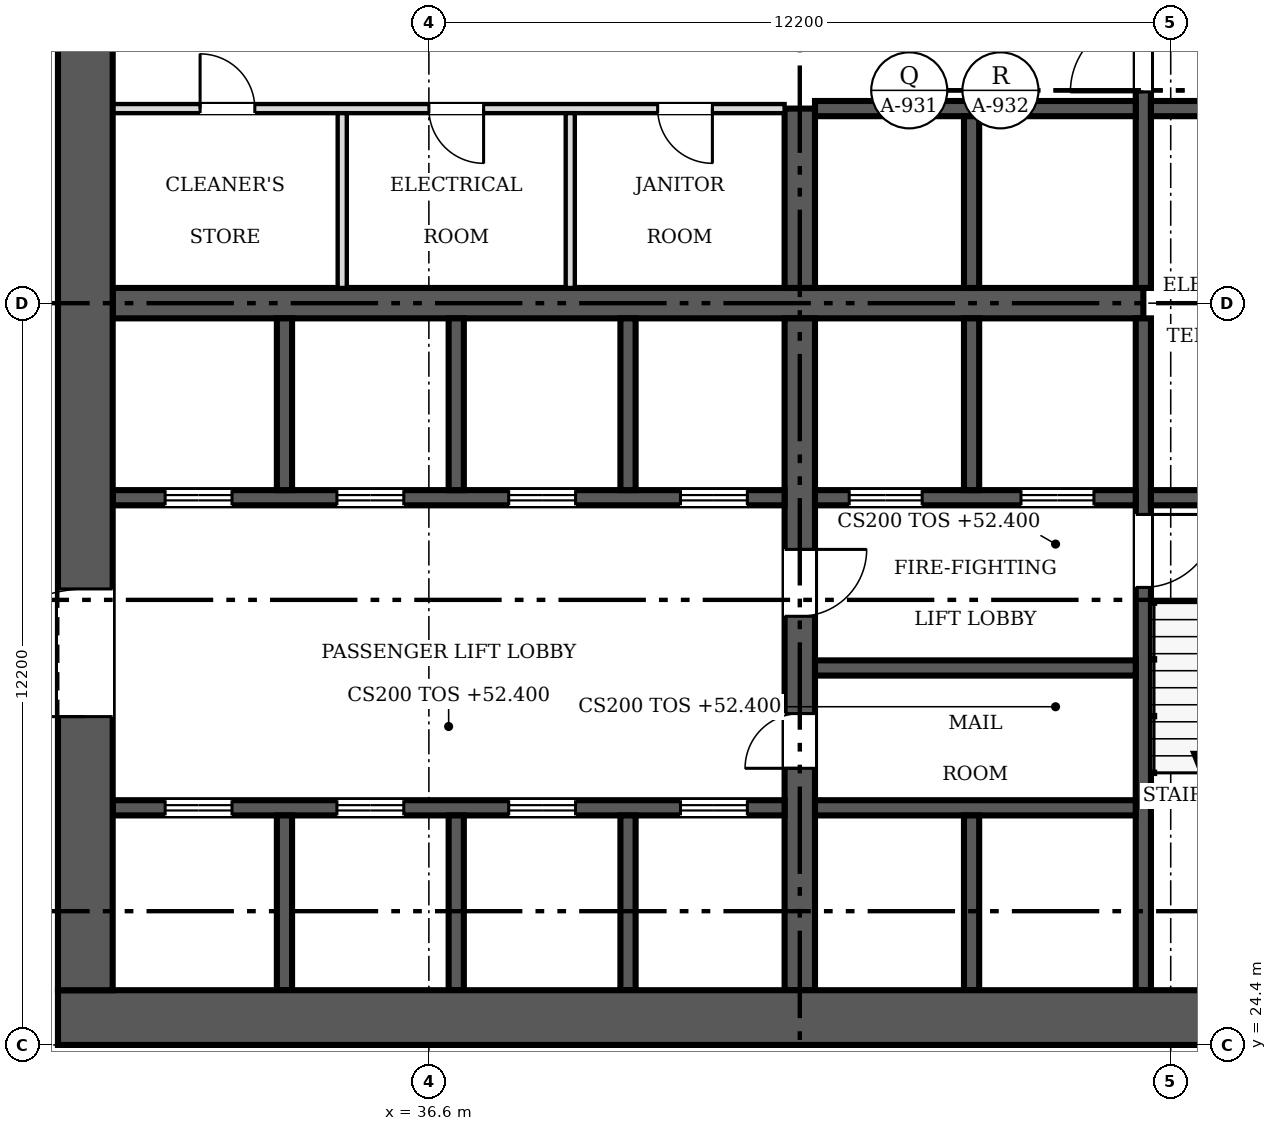
"""IFC4 building model, lengths in metres.
Left out: names, types, materials, properties, quantities, classifications, styles, units other than length and angle.
Written with IfcOpenShell. Run it as: python <this file> out.ifc"""

import sys

from ifc_helpers import new_model, si_unit, direction, frame, frame_2d, origin, place, context, subcontext, project, spatial, rectangle, extrude, source, transform, mapped, element, fill, save


model = new_model("IFC4")
c1 = context("Model", 3, precision=1e-05, world=origin(), true_north=direction((0.0, 1.0)))
c2 = subcontext(c1, "Body", "Model", "MODEL_VIEW")
j1 = project(units=[si_unit("LENGTHUNIT", "METRE"), si_unit("PLANEANGLEUNIT", "RADIAN")], contexts=[c1])
p1 = place(None, origin())
s1 = spatial("IfcSite", under=j1, at=p1, CompositionType="ELEMENT")
p2 = place(p1, origin())
s2 = spatial("IfcBuilding", under=s1, at=p2, CompositionType="ELEMENT")
p3 = place(p2, frame((0.0, 0.0, 52.4)))
s3 = spatial("IfcBuildingStorey", under=s2, at=p3, CompositionType="ELEMENT", Elevation=52.4)
p4 = place(p3, frame((54.9, 24.85, 0.0), z_axis=(0.0, 0.0, 1.0), x_axis=(-1.0, 0.0, 0.0)))
e1 = element("IfcWall", 1, at=p4, inside=s3, PredefinedType="SHEAR", context=c2, shape_type="SweptSolid", body=[
    extrude(rectangle(XDim=24.4, YDim=0.9, at=frame_2d((12.2, 0.0))), origin(), (0.0, 0.0, 1.0), 3.8),
])
m1 = source(origin(), c2, "Body", "SweptSolid", [
    extrude(rectangle(XDim=1.2, YDim=2.1, at=frame_2d((0.6, 1.05))), frame((0.0, 0.46, 0.0), z_axis=(0.0, -1.0, 0.0), x_axis=(1.0, 0.0, 0.0)), (0.0, 0.0, 1.0), 0.92),
])
p5 = place(p4, frame((1.5, 0.0, 0.0)))
e2 = element("IfcOpeningElement", 2, at=p5, cuts=e1, PredefinedType="OPENING", context=c2, shape_type="MappedRepresentation", body=[
    mapped(m1, transform((0.0, 0.0, 0.0), scale=1.0)),
])
p6 = place(p3, frame((30.95, 25.3, 0.0), z_axis=(0.0, 0.0, 1.0), x_axis=(0.0, 1.0, 0.0)))
e3 = element("IfcWall", 3, at=p6, inside=s3, PredefinedType="SHEAR", context=c2, shape_type="SweptSolid", body=[
    extrude(rectangle(XDim=22.6, YDim=0.9, at=frame_2d((11.3, 0.0))), origin(), (0.0, 0.0, 1.0), 3.8),
])
m2 = source(origin(), c2, "Body", "SweptSolid", [
    extrude(rectangle(XDim=2.1, YDim=2.4, at=frame_2d((1.05, 1.2))), frame((0.0, 0.46, 0.0), z_axis=(0.0, -1.0, 0.0), x_axis=(1.0, 0.0, 0.0)), (0.0, 0.0, 1.0), 0.92),
])
p7 = place(p6, frame((4.5, 0.0, 0.0)))
e4 = element("IfcOpeningElement", 4, at=p7, cuts=e3, PredefinedType="OPENING", context=c2, shape_type="MappedRepresentation", body=[
    mapped(m2, transform((0.0, 0.0, 0.0), scale=1.0)),
])
p8 = place(p6, frame((16.0, 0.0, 0.0)))
e5 = element("IfcOpeningElement", 5, at=p8, cuts=e3, PredefinedType="OPENING", context=c2, shape_type="MappedRepresentation", body=[
    mapped(m2, transform((0.0, 0.0, 0.0), scale=1.0)),
])
p9 = place(p3, frame((31.4, 36.6, 0.0), z_axis=(0.0, 0.0, 1.0), x_axis=(1.0, 0.0, 0.0)))
e6 = element("IfcWall", 6, at=p9, inside=s3, PredefinedType="SHEAR", context=c2, shape_type="SweptSolid", body=[
    extrude(rectangle(XDim=16.95, YDim=0.5, at=frame_2d((8.475, 0.0))), origin(), (0.0, 0.0, 1.0), 3.8),
])
p10 = place(p3, frame((42.7, 36.35, 0.0), z_axis=(0.0, 0.0, 1.0), x_axis=(0.0, -1.0, 0.0)))
e7 = element("IfcWall", 7, at=p10, inside=s3, PredefinedType="SHEAR", context=c2, shape_type="SweptSolid", body=[
    extrude(rectangle(XDim=11.05, YDim=0.5, at=frame_2d((5.525, 0.0))), origin(), (0.0, 0.0, 1.0), 3.8),
])
m3 = source(origin(), c2, "Body", "SweptSolid", [
    extrude(rectangle(XDim=0.9, YDim=2.1, at=frame_2d((0.45, 1.05))), frame((0.0, 0.26, 0.0), z_axis=(0.0, -1.0, 0.0), x_axis=(1.0, 0.0, 0.0)), (0.0, 0.0, 1.0), 0.52),
])
p11 = place(p10, frame((6.5, 0.0, 0.0)))
e8 = element("IfcOpeningElement", 8, at=p11, cuts=e7, PredefinedType="OPENING", context=c2, shape_type="MappedRepresentation", body=[
    mapped(m3, transform((0.0, 0.0, 0.0), scale=1.0)),
])
m4 = source(origin(), c2, "Body", "SweptSolid", [
    extrude(rectangle(XDim=1.1, YDim=2.1, at=frame_2d((0.55, 1.05))), frame((0.0, 0.26, 0.0), z_axis=(0.0, -1.0, 0.0), x_axis=(1.0, 0.0, 0.0)), (0.0, 0.0, 1.0), 0.52),
])
p12 = place(p10, frame((3.8, 0.0, 0.0)))
e9 = element("IfcOpeningElement", 9, at=p12, cuts=e7, PredefinedType="OPENING", context=c2, shape_type="MappedRepresentation", body=[
    mapped(m4, transform((0.0, 0.0, 0.0), scale=1.0)),
])
p13 = place(p3, frame((42.7, 36.85, 0.0), z_axis=(0.0, 0.0, 1.0), x_axis=(0.0, 1.0, 0.0)))
e10 = element("IfcWall", 10, at=p13, inside=s3, PredefinedType="SHEAR", context=c2, shape_type="SweptSolid", body=[
    extrude(rectangle(XDim=2.95, YDim=0.5, at=frame_2d((1.475, 0.0))), origin(), (0.0, 0.0, 1.0), 3.8),
])
p14 = place(p3, frame((48.35, 36.35, 0.0), z_axis=(0.0, 0.0, 1.0), x_axis=(0.0, -1.0, 0.0)))
e11 = element("IfcWall", 11, at=p14, inside=s3, PredefinedType="SOLIDWALL", context=c2, shape_type="SweptSolid", body=[
    extrude(rectangle(XDim=11.05, YDim=0.25, at=frame_2d((5.525, 0.0))), origin(), (0.0, 0.0, 1.0), 3.8),
])
m5 = source(origin(), c2, "Body", "SweptSolid", [
    extrude(rectangle(XDim=1.2, YDim=2.1, at=frame_2d((0.6, 1.05))), frame((0.0, 0.135, 0.0), z_axis=(0.0, -1.0, 0.0), x_axis=(1.0, 0.0, 0.0)), (0.0, 0.0, 1.0), 0.27),
])
p15 = place(p14, frame((3.225, 0.0, 0.0)))
e12 = element("IfcOpeningElement", 12, at=p15, cuts=e11, PredefinedType="OPENING", context=c2, shape_type="MappedRepresentation", body=[
    mapped(m5, transform((0.0, 0.0, 0.0), scale=1.0)),
])
p16 = place(p3, frame((48.35, 47.9, 0.0), z_axis=(0.0, 0.0, 1.0), x_axis=(0.0, -1.0, 0.0)))
e13 = element("IfcWall", 13, at=p16, inside=s3, PredefinedType="SOLIDWALL", context=c2, shape_type="SweptSolid", body=[
    extrude(rectangle(XDim=11.05, YDim=0.25, at=frame_2d((5.525, 0.0))), origin(), (0.0, 0.0, 1.0), 3.8),
])
p17 = place(p16, frame((6.625, 0.0, 0.0)))
e14 = element("IfcOpeningElement", 14, at=p17, cuts=e13, PredefinedType="OPENING", context=c2, shape_type="MappedRepresentation", body=[
    mapped(m5, transform((0.0, 0.0, 0.0), scale=1.0)),
])
p18 = place(p3, frame((42.45, 33.4, 0.0), z_axis=(0.0, 0.0, 1.0), x_axis=(-1.0, 0.0, 0.0)))
e15 = element("IfcWall", 15, at=p18, inside=s3, PredefinedType="SOLIDWALL", context=c2, shape_type="SweptSolid", body=[
    extrude(rectangle(XDim=11.05, YDim=0.25, at=frame_2d((5.525, 0.0))), origin(), (0.0, 0.0, 1.0), 3.8),
])
m6 = source(origin(), c2, "Body", "SweptSolid", [
    extrude(rectangle(XDim=1.1, YDim=2.1, at=frame_2d((0.55, 1.05))), frame((0.0, 0.135, 0.0), z_axis=(0.0, -1.0, 0.0), x_axis=(1.0, 0.0, 0.0)), (0.0, 0.0, 1.0), 0.27),
])
p19 = place(p18, frame((9.087, 0.0, 0.0)))
e16 = element("IfcOpeningElement", 16, at=p19, cuts=e15, PredefinedType="OPENING", context=c2, shape_type="MappedRepresentation", body=[
    mapped(m6, transform((0.0, 0.0, 0.0), scale=1.0)),
])
p20 = place(p18, frame((6.262, 0.0, 0.0)))
e17 = element("IfcOpeningElement", 17, at=p20, cuts=e15, PredefinedType="OPENING", context=c2, shape_type="MappedRepresentation", body=[
    mapped(m6, transform((0.0, 0.0, 0.0), scale=1.0)),
])
p21 = place(p18, frame((3.438, 0.0, 0.0)))
e18 = element("IfcOpeningElement", 18, at=p21, cuts=e15, PredefinedType="OPENING", context=c2, shape_type="MappedRepresentation", body=[
    mapped(m6, transform((0.0, 0.0, 0.0), scale=1.0)),
])
p22 = place(p18, frame((0.613, 0.0, 0.0)))
e19 = element("IfcOpeningElement", 19, at=p22, cuts=e15, PredefinedType="OPENING", context=c2, shape_type="MappedRepresentation", body=[
    mapped(m6, transform((0.0, 0.0, 0.0), scale=1.0)),
])
p23 = place(p3, frame((48.225, 33.4, 0.0), z_axis=(0.0, 0.0, 1.0), x_axis=(-1.0, 0.0, 0.0)))
e20 = element("IfcWall", 20, at=p23, inside=s3, PredefinedType="SOLIDWALL", context=c2, shape_type="SweptSolid", body=[
    extrude(rectangle(XDim=5.275, YDim=0.25, at=frame_2d((2.638, 0.0))), origin(), (0.0, 0.0, 1.0), 3.8),
])
p24 = place(p23, frame((3.512, 0.0, 0.0)))
e21 = element("IfcOpeningElement", 21, at=p24, cuts=e20, PredefinedType="OPENING", context=c2, shape_type="MappedRepresentation", body=[
    mapped(m5, transform((0.0, 0.0, 0.0), scale=1.0)),
])
p25 = place(p23, frame((0.688, 0.0, 0.0)))
e22 = element("IfcOpeningElement", 22, at=p25, cuts=e20, PredefinedType="OPENING", context=c2, shape_type="MappedRepresentation", body=[
    mapped(m5, transform((0.0, 0.0, 0.0), scale=1.0)),
])
p26 = place(p3, frame((48.475, 33.4, 0.0), z_axis=(0.0, 0.0, 1.0), x_axis=(1.0, 0.0, 0.0)))
e23 = element("IfcWall", 23, at=p26, inside=s3, PredefinedType="SOLIDWALL", context=c2, shape_type="SweptSolid", body=[
    extrude(rectangle(XDim=3.525, YDim=0.25, at=frame_2d((1.762, 0.0))), origin(), (0.0, 0.0, 1.0), 3.8),
])
p27 = place(p3, frame((31.4, 28.3, 0.0), z_axis=(0.0, 0.0, 1.0), x_axis=(1.0, 0.0, 0.0)))
e24 = element("IfcWall", 24, at=p27, inside=s3, PredefinedType="SOLIDWALL", context=c2, shape_type="SweptSolid", body=[
    extrude(rectangle(XDim=11.05, YDim=0.25, at=frame_2d((5.525, 0.0))), origin(), (0.0, 0.0, 1.0), 3.8),
])
p28 = place(p27, frame((0.863, 0.0, 0.0)))
e25 = element("IfcOpeningElement", 25, at=p28, cuts=e24, PredefinedType="OPENING", context=c2, shape_type="MappedRepresentation", body=[
    mapped(m6, transform((0.0, 0.0, 0.0), scale=1.0)),
])
p29 = place(p27, frame((3.688, 0.0, 0.0)))
e26 = element("IfcOpeningElement", 26, at=p29, cuts=e24, PredefinedType="OPENING", context=c2, shape_type="MappedRepresentation", body=[
    mapped(m6, transform((0.0, 0.0, 0.0), scale=1.0)),
])
p30 = place(p27, frame((6.512, 0.0, 0.0)))
e27 = element("IfcOpeningElement", 27, at=p30, cuts=e24, PredefinedType="OPENING", context=c2, shape_type="MappedRepresentation", body=[
    mapped(m6, transform((0.0, 0.0, 0.0), scale=1.0)),
])
p31 = place(p27, frame((9.337, 0.0, 0.0)))
e28 = element("IfcOpeningElement", 28, at=p31, cuts=e24, PredefinedType="OPENING", context=c2, shape_type="MappedRepresentation", body=[
    mapped(m6, transform((0.0, 0.0, 0.0), scale=1.0)),
])
for number, where, z_axis, x_axis in (
    (29, (42.95, 28.3, 0.0), (0.0, 0.0, 1.0), (1.0, 0.0, 0.0)),
    (30, (42.95, 39.8, 0.0), (0.0, 0.0, 1.0), (1.0, 0.0, 0.0)),
):
    element("IfcWall", number, at=place(p3, frame(where, z_axis=z_axis, x_axis=x_axis)), inside=s3, PredefinedType="SOLIDWALL", context=c2, shape_type="SweptSolid", body=[
        extrude(rectangle(XDim=5.275, YDim=0.25, at=frame_2d((2.638, 0.0))), origin(), (0.0, 0.0, 1.0), 3.8),
    ])
p32 = place(p3, frame((48.475, 39.8, 0.0), z_axis=(0.0, 0.0, 1.0), x_axis=(1.0, 0.0, 0.0)))
e31 = element("IfcWall", 31, at=p32, inside=s3, PredefinedType="SOLIDWALL", context=c2, shape_type="SweptSolid", body=[
    extrude(rectangle(XDim=3.525, YDim=0.25, at=frame_2d((1.762, 0.0))), origin(), (0.0, 0.0, 1.0), 3.8),
])
p33 = place(p3, frame((45.525, 33.525, 0.0), z_axis=(0.0, 0.0, 1.0), x_axis=(0.0, 1.0, 0.0)))
e32 = element("IfcWall", 32, at=p33, inside=s3, PredefinedType="SOLIDWALL", context=c2, shape_type="SweptSolid", body=[
    extrude(rectangle(XDim=2.825, YDim=0.25, at=frame_2d((1.413, 0.0))), origin(), (0.0, 0.0, 1.0), 3.8),
])
p34 = place(p3, frame((45.525, 36.85, 0.0), z_axis=(0.0, 0.0, 1.0), x_axis=(0.0, 1.0, 0.0)))
e33 = element("IfcWall", 33, at=p34, inside=s3, PredefinedType="SOLIDWALL", context=c2, shape_type="SweptSolid", body=[
    extrude(rectangle(XDim=2.825, YDim=0.25, at=frame_2d((1.413, 0.0))), origin(), (0.0, 0.0, 1.0), 3.8),
])
p35 = place(p3, frame((42.95, 30.6, 0.0), z_axis=(0.0, 0.0, 1.0), x_axis=(1.0, 0.0, 0.0)))
e34 = element("IfcWall", 34, at=p35, inside=s3, PredefinedType="SOLIDWALL", context=c2, shape_type="SweptSolid", body=[
    extrude(rectangle(XDim=5.275, YDim=0.25, at=frame_2d((2.638, 0.0))), origin(), (0.0, 0.0, 1.0), 3.8),
])
for number, where, z_axis, x_axis in (
    (35, (34.225, 33.525, 0.0), (0.0, 0.0, 1.0), (0.0, 1.0, 0.0)),
    (36, (37.05, 33.525, 0.0), (0.0, 0.0, 1.0), (0.0, 1.0, 0.0)),
    (37, (39.875, 33.525, 0.0), (0.0, 0.0, 1.0), (0.0, 1.0, 0.0)),
):
    element("IfcWall", number, at=place(p3, frame(where, z_axis=z_axis, x_axis=x_axis)), inside=s3, PredefinedType="SOLIDWALL", context=c2, shape_type="SweptSolid", body=[
        extrude(rectangle(XDim=2.825, YDim=0.25, at=frame_2d((1.413, 0.0))), origin(), (0.0, 0.0, 1.0), 3.8),
    ])
for number, where, z_axis, x_axis in (
    (38, (34.225, 25.3, 0.0), (0.0, 0.0, 1.0), (0.0, 1.0, 0.0)),
    (39, (37.05, 25.3, 0.0), (0.0, 0.0, 1.0), (0.0, 1.0, 0.0)),
    (40, (39.875, 25.3, 0.0), (0.0, 0.0, 1.0), (0.0, 1.0, 0.0)),
    (41, (45.525, 25.3, 0.0), (0.0, 0.0, 1.0), (0.0, 1.0, 0.0)),
):
    element("IfcWall", number, at=place(p3, frame(where, z_axis=z_axis, x_axis=x_axis)), inside=s3, PredefinedType="SOLIDWALL", context=c2, shape_type="SweptSolid", body=[
        extrude(rectangle(XDim=2.875, YDim=0.25, at=frame_2d((1.438, 0.0))), origin(), (0.0, 0.0, 1.0), 3.8),
    ])
p36 = place(p3, frame((42.45, 39.8, 0.0), z_axis=(0.0, 0.0, 1.0), x_axis=(-1.0, 0.0, 0.0)))
e42 = element("IfcWall", 42, at=p36, inside=s3, PredefinedType="PARTITIONING", context=c2, shape_type="SweptSolid", body=[
    extrude(rectangle(XDim=11.05, YDim=0.15, at=frame_2d((5.525, 0.0))), origin(), (0.0, 0.0, 1.0), 3.6),
])
m7 = source(origin(), c2, "Body", "SweptSolid", [
    extrude(rectangle(XDim=0.9, YDim=2.1, at=frame_2d((0.45, 1.05))), frame((0.0, 0.085, 0.0), z_axis=(0.0, -1.0, 0.0), x_axis=(1.0, 0.0, 0.0)), (0.0, 0.0, 1.0), 0.17),
])
p37 = place(p36, frame((8.712, 0.0, 0.0)))
e43 = element("IfcOpeningElement", 43, at=p37, cuts=e42, PredefinedType="OPENING", context=c2, shape_type="MappedRepresentation", body=[
    mapped(m7, transform((0.0, 0.0, 0.0), scale=1.0)),
])
p38 = place(p36, frame((4.95, 0.0, 0.0)))
e44 = element("IfcOpeningElement", 44, at=p38, cuts=e42, PredefinedType="OPENING", context=c2, shape_type="MappedRepresentation", body=[
    mapped(m7, transform((0.0, 0.0, 0.0), scale=1.0)),
])
p39 = place(p36, frame((1.188, 0.0, 0.0)))
e45 = element("IfcOpeningElement", 45, at=p39, cuts=e42, PredefinedType="OPENING", context=c2, shape_type="MappedRepresentation", body=[
    mapped(m7, transform((0.0, 0.0, 0.0), scale=1.0)),
])
for number, where, z_axis, x_axis in (
    (46, (35.175, 36.85, 0.0), (0.0, 0.0, 1.0), (0.0, 1.0, 0.0)),
    (47, (38.925, 36.85, 0.0), (0.0, 0.0, 1.0), (0.0, 1.0, 0.0)),
):
    element("IfcWall", number, at=place(p3, frame(where, z_axis=z_axis, x_axis=x_axis)), inside=s3, PredefinedType="PARTITIONING", context=c2, shape_type="SweptSolid", body=[
        extrude(rectangle(XDim=2.875, YDim=0.15, at=frame_2d((1.438, 0.0))), origin(), (0.0, 0.0, 1.0), 3.6),
    ])
m8 = source(origin(), c2, "Body", "SweptSolid", [
    extrude(rectangle(XDim=2.1, YDim=2.4, at=frame_2d((1.05, 1.2))), frame((0.0, 0.025, 0.0), z_axis=(0.0, -1.0, 0.0), x_axis=(1.0, 0.0, 0.0)), (0.0, 0.0, 1.0), 0.05),
])
p40 = place(p7, origin())
e48 = element("IfcDoor", 48, at=p40, inside=s3, OperationType="DOUBLE_DOOR_SINGLE_SWING", PredefinedType="DOOR", context=c2, shape_type="MappedRepresentation", body=[
    mapped(m8, transform((0.0, 0.0, 0.0), scale=1.0)),
])
fill(e4, e48)
m9 = source(origin(), c2, "Body", "SweptSolid", [
    extrude(rectangle(XDim=0.9, YDim=2.1, at=frame_2d((0.45, 1.05))), frame((0.0, 0.025, 0.0), z_axis=(0.0, -1.0, 0.0), x_axis=(1.0, 0.0, 0.0)), (0.0, 0.0, 1.0), 0.05),
])
p41 = place(p11, origin())
e49 = element("IfcDoor", 49, at=p41, inside=s3, OperationType="SINGLE_SWING_RIGHT", PredefinedType="DOOR", context=c2, shape_type="MappedRepresentation", body=[
    mapped(m9, transform((0.0, 0.0, 0.0), scale=1.0)),
])
fill(e8, e49)
m10 = source(origin(), c2, "Body", "SweptSolid", [
    extrude(rectangle(XDim=1.1, YDim=2.1, at=frame_2d((0.55, 1.05))), frame((0.0, 0.025, 0.0), z_axis=(0.0, -1.0, 0.0), x_axis=(1.0, 0.0, 0.0)), (0.0, 0.0, 1.0), 0.05),
])
p42 = place(p12, origin())
e50 = element("IfcDoor", 50, at=p42, inside=s3, OperationType="SINGLE_SWING_LEFT", PredefinedType="DOOR", context=c2, shape_type="MappedRepresentation", body=[
    mapped(m10, transform((0.0, 0.0, 0.0), scale=1.0)),
])
fill(e9, e50)
m11 = source(origin(), c2, "Body", "SweptSolid", [
    extrude(rectangle(XDim=1.2, YDim=2.1, at=frame_2d((0.6, 1.05))), frame((0.0, 0.025, 0.0), z_axis=(0.0, -1.0, 0.0), x_axis=(1.0, 0.0, 0.0)), (0.0, 0.0, 1.0), 0.05),
])
p43 = place(p15, origin())
e51 = element("IfcDoor", 51, at=p43, inside=s3, OperationType="SINGLE_SWING_LEFT", PredefinedType="DOOR", context=c2, shape_type="MappedRepresentation", body=[
    mapped(m11, transform((0.0, 0.0, 0.0), scale=1.0)),
])
fill(e12, e51)
p44 = place(p17, origin())
e52 = element("IfcDoor", 52, at=p44, inside=s3, OperationType="SINGLE_SWING_RIGHT", PredefinedType="DOOR", context=c2, shape_type="MappedRepresentation", body=[
    mapped(m11, transform((0.0, 0.0, 0.0), scale=1.0)),
])
fill(e14, e52)
p45 = place(p19, origin())
e53 = element("IfcDoor", 53, at=p45, inside=s3, OperationType="DOUBLE_DOOR_SLIDING", PredefinedType="DOOR", context=c2, shape_type="MappedRepresentation", body=[
    mapped(m10, transform((0.0, 0.0, 0.0), scale=1.0)),
])
fill(e16, e53)
p46 = place(p20, origin())
e54 = element("IfcDoor", 54, at=p46, inside=s3, OperationType="DOUBLE_DOOR_SLIDING", PredefinedType="DOOR", context=c2, shape_type="MappedRepresentation", body=[
    mapped(m10, transform((0.0, 0.0, 0.0), scale=1.0)),
])
fill(e17, e54)
p47 = place(p21, origin())
e55 = element("IfcDoor", 55, at=p47, inside=s3, OperationType="DOUBLE_DOOR_SLIDING", PredefinedType="DOOR", context=c2, shape_type="MappedRepresentation", body=[
    mapped(m10, transform((0.0, 0.0, 0.0), scale=1.0)),
])
fill(e18, e55)
p48 = place(p22, origin())
e56 = element("IfcDoor", 56, at=p48, inside=s3, OperationType="DOUBLE_DOOR_SLIDING", PredefinedType="DOOR", context=c2, shape_type="MappedRepresentation", body=[
    mapped(m10, transform((0.0, 0.0, 0.0), scale=1.0)),
])
fill(e19, e56)
p49 = place(p24, origin())
e57 = element("IfcDoor", 57, at=p49, inside=s3, OperationType="DOUBLE_DOOR_SLIDING", PredefinedType="DOOR", context=c2, shape_type="MappedRepresentation", body=[
    mapped(m11, transform((0.0, 0.0, 0.0), scale=1.0)),
])
fill(e21, e57)
p50 = place(p25, origin())
e58 = element("IfcDoor", 58, at=p50, inside=s3, OperationType="DOUBLE_DOOR_SLIDING", PredefinedType="DOOR", context=c2, shape_type="MappedRepresentation", body=[
    mapped(m11, transform((0.0, 0.0, 0.0), scale=1.0)),
])
fill(e22, e58)
p51 = place(p28, origin())
e59 = element("IfcDoor", 59, at=p51, inside=s3, OperationType="DOUBLE_DOOR_SLIDING", PredefinedType="DOOR", context=c2, shape_type="MappedRepresentation", body=[
    mapped(m10, transform((0.0, 0.0, 0.0), scale=1.0)),
])
fill(e25, e59)
p52 = place(p29, origin())
e60 = element("IfcDoor", 60, at=p52, inside=s3, OperationType="DOUBLE_DOOR_SLIDING", PredefinedType="DOOR", context=c2, shape_type="MappedRepresentation", body=[
    mapped(m10, transform((0.0, 0.0, 0.0), scale=1.0)),
])
fill(e26, e60)
p53 = place(p30, origin())
e61 = element("IfcDoor", 61, at=p53, inside=s3, OperationType="DOUBLE_DOOR_SLIDING", PredefinedType="DOOR", context=c2, shape_type="MappedRepresentation", body=[
    mapped(m10, transform((0.0, 0.0, 0.0), scale=1.0)),
])
fill(e27, e61)
p54 = place(p31, origin())
e62 = element("IfcDoor", 62, at=p54, inside=s3, OperationType="DOUBLE_DOOR_SLIDING", PredefinedType="DOOR", context=c2, shape_type="MappedRepresentation", body=[
    mapped(m10, transform((0.0, 0.0, 0.0), scale=1.0)),
])
fill(e28, e62)
p55 = place(p37, origin())
e63 = element("IfcDoor", 63, at=p55, inside=s3, OperationType="SINGLE_SWING_RIGHT", PredefinedType="DOOR", context=c2, shape_type="MappedRepresentation", body=[
    mapped(m9, transform((0.0, 0.0, 0.0), scale=1.0)),
])
fill(e43, e63)
p56 = place(p38, origin())
e64 = element("IfcDoor", 64, at=p56, inside=s3, OperationType="SINGLE_SWING_LEFT", PredefinedType="DOOR", context=c2, shape_type="MappedRepresentation", body=[
    mapped(m9, transform((0.0, 0.0, 0.0), scale=1.0)),
])
fill(e44, e64)
p57 = place(p39, origin())
e65 = element("IfcDoor", 65, at=p57, inside=s3, OperationType="SINGLE_SWING_LEFT", PredefinedType="DOOR", context=c2, shape_type="MappedRepresentation", body=[
    mapped(m9, transform((0.0, 0.0, 0.0), scale=1.0)),
])
fill(e45, e65)
save(model, sys.argv[1])
